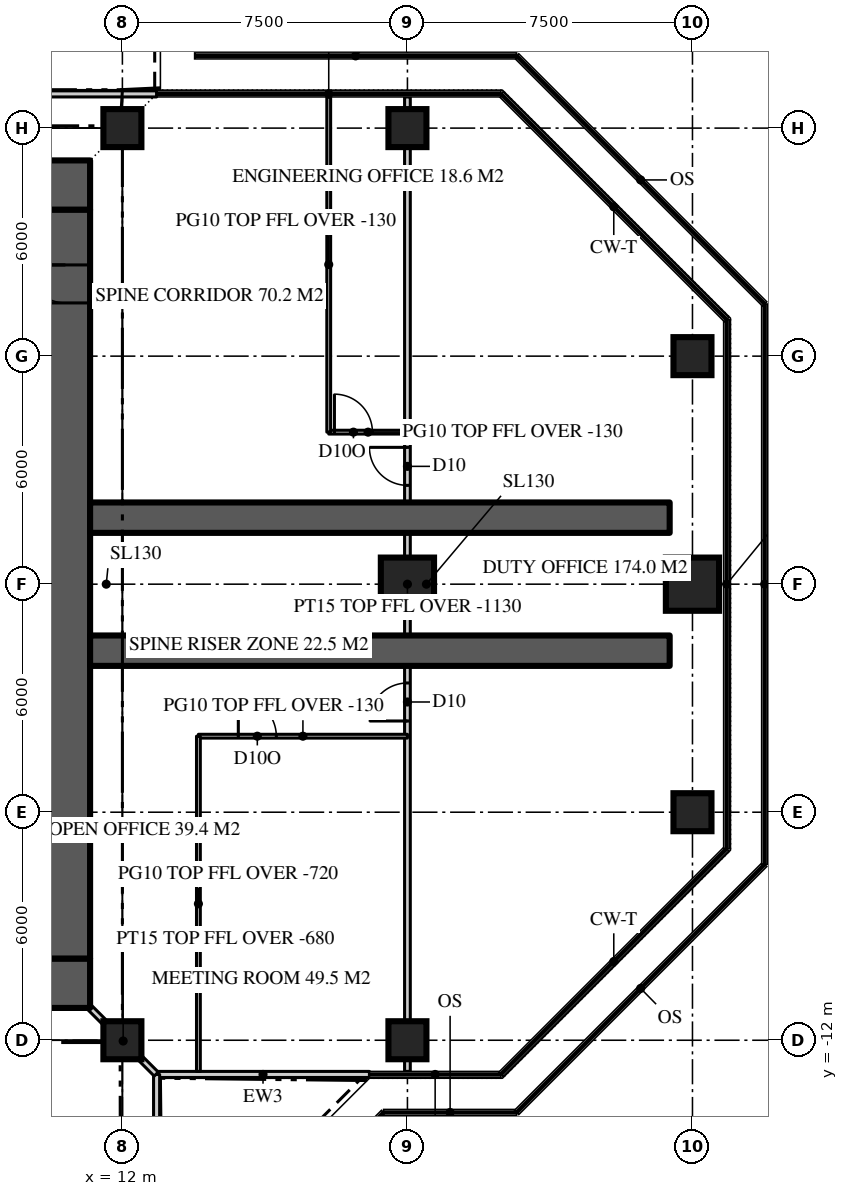
"""IFC4 building model, lengths in metres.
Left out: names, types, materials, properties, quantities, classifications, styles, units other than length and angle.
Written with IfcOpenShell. Run it as: python <this file> out.ifc"""

import sys

from ifc_helpers import new_model, si_unit, direction, frame, frame_2d, origin, origin_2d, place, context, subcontext, project, spatial, rectangle, extrude, element, fill, save


model = new_model("IFC4")
c1 = context("Model", 3, precision=1e-05, world=origin(), true_north=direction((0.0, 1.0)))
c2 = subcontext(c1, "Body", "Model", "MODEL_VIEW")
j1 = project(units=[si_unit("LENGTHUNIT", "METRE"), si_unit("PLANEANGLEUNIT", "RADIAN")], contexts=[c1])
p1 = place(None, origin())
s1 = spatial("IfcSite", under=j1, at=p1, CompositionType="ELEMENT")
p2 = place(p1, origin())
s2 = spatial("IfcBuilding", under=s1, at=p2, CompositionType="ELEMENT")
p3 = place(p2, frame((0.0, 0.0, 267.3)))
s3 = spatial("IfcBuildingStorey", under=s2, at=p3, CompositionType="ELEMENT", Elevation=267.3)
p4 = place(p3, frame((-11.15, 10.5, 0.0), z_axis=(0.0, 0.0, 1.0), x_axis=(1.0, 0.0, 0.0)))
e1 = element("IfcWall", 1, at=p4, inside=s3, PredefinedType="SHEAR", context=c2, shape_type="SweptSolid", body=[
    extrude(rectangle(XDim=22.3, YDim=1.3, at=frame_2d((11.15, 0.0))), origin(), (0.0, 0.0, 1.0), 3.9),
])
p5 = place(p4, frame((4.25, 0.0, 0.0)))
e2 = element("IfcOpeningElement", 2, at=p5, cuts=e1, PredefinedType="OPENING", context=c2, shape_type="SweptSolid", body=[
    extrude(rectangle(XDim=1.8, YDim=2.2, at=frame_2d((0.9, 1.1))), frame((0.0, 0.66, 0.0), z_axis=(0.0, -1.0, 0.0), x_axis=(1.0, 0.0, 0.0)), (0.0, 0.0, 1.0), 1.32),
])
p6 = place(p4, frame((16.25, 0.0, 0.0)))
e3 = element("IfcOpeningElement", 3, at=p6, cuts=e1, PredefinedType="OPENING", context=c2, shape_type="SweptSolid", body=[
    extrude(rectangle(XDim=1.8, YDim=2.2, at=frame_2d((0.9, 1.1))), frame((0.0, 0.66, 0.0), z_axis=(0.0, -1.0, 0.0), x_axis=(1.0, 0.0, 0.0)), (0.0, 0.0, 1.0), 1.32),
])
p7 = place(p3, frame((11.15, -10.5, 0.0), z_axis=(0.0, 0.0, 1.0), x_axis=(-1.0, 0.0, 0.0)))
e4 = element("IfcWall", 4, at=p7, inside=s3, PredefinedType="SHEAR", context=c2, shape_type="SweptSolid", body=[
    extrude(rectangle(XDim=22.3, YDim=1.3, at=frame_2d((11.15, 0.0))), origin(), (0.0, 0.0, 1.0), 3.9),
])
p8 = place(p7, frame((16.25, 0.0, 0.0)))
e5 = element("IfcOpeningElement", 5, at=p8, cuts=e4, PredefinedType="OPENING", context=c2, shape_type="SweptSolid", body=[
    extrude(rectangle(XDim=1.8, YDim=2.2, at=frame_2d((0.9, 1.1))), frame((0.0, 0.66, 0.0), z_axis=(0.0, -1.0, 0.0), x_axis=(1.0, 0.0, 0.0)), (0.0, 0.0, 1.0), 1.32),
])
p9 = place(p7, frame((4.25, 0.0, 0.0)))
e6 = element("IfcOpeningElement", 6, at=p9, cuts=e4, PredefinedType="OPENING", context=c2, shape_type="SweptSolid", body=[
    extrude(rectangle(XDim=1.8, YDim=2.2, at=frame_2d((0.9, 1.1))), frame((0.0, 0.66, 0.0), z_axis=(0.0, -1.0, 0.0), x_axis=(1.0, 0.0, 0.0)), (0.0, 0.0, 1.0), 1.32),
])
p10 = place(p3, frame((10.5, -9.85, 0.0), z_axis=(0.0, 0.0, 1.0), x_axis=(0.0, 1.0, 0.0)))
e7 = element("IfcWall", 7, at=p10, inside=s3, PredefinedType="SHEAR", context=c2, shape_type="SweptSolid", body=[
    extrude(rectangle(XDim=19.7, YDim=1.3, at=frame_2d((9.85, 0.0))), origin(), (0.0, 0.0, 1.0), 3.9),
])
p11 = place(p10, frame((17.25, 0.0, 0.0)))
e8 = element("IfcOpeningElement", 8, at=p11, cuts=e7, PredefinedType="OPENING", context=c2, shape_type="SweptSolid", body=[
    extrude(rectangle(XDim=1.0, YDim=2.2, at=frame_2d((0.5, 1.1))), frame((0.0, 0.66, 0.0), z_axis=(0.0, -1.0, 0.0), x_axis=(1.0, 0.0, 0.0)), (0.0, 0.0, 1.0), 1.32),
])
for number, where, z_axis, x_axis in (
    (9, (11.15, -1.75, 0.0), (0.0, 0.0, 1.0), (1.0, 0.0, 0.0)),
    (10, (11.15, 1.75, 0.0), (0.0, 0.0, 1.0), (1.0, 0.0, 0.0)),
):
    element("IfcWall", number, at=place(p3, frame(where, z_axis=z_axis, x_axis=x_axis)), inside=s3, PredefinedType="SHEAR", context=c2, shape_type="SweptSolid", body=[
        extrude(rectangle(XDim=15.25, YDim=0.8, at=frame_2d((7.625, 0.0))), origin(), (0.0, 0.0, 1.0), 3.9),
    ])
for number, where, z_axis, x_axis in (
    (11, (12.0, -12.0, 0.0), (0.0, 0.0, 1.0), (1.0, 0.0, 0.0)),
    (12, (19.5, -12.0, 0.0), (0.0, 0.0, 1.0), (1.0, 0.0, 0.0)),
    (13, (27.0, -6.0, 0.0), (0.0, 0.0, 1.0), (1.0, 0.0, 0.0)),
):
    element("IfcColumn", number, at=place(p3, frame(where, z_axis=z_axis, x_axis=x_axis)), inside=s3, PredefinedType="COLUMN", context=c2, shape_type="SweptSolid", body=[
        extrude(rectangle(XDim=1.0, YDim=1.0, at=origin_2d()), origin(), (0.0, 0.0, 1.0), 3.9),
    ])
for number, where, z_axis, x_axis in (
    (14, (19.5, 0.0, 0.0), (0.0, 0.0, 1.0), (1.0, 0.0, 0.0)),
    (15, (27.0, 0.0, 0.0), (0.0, 0.0, 1.0), (1.0, 0.0, 0.0)),
):
    element("IfcColumn", number, at=place(p3, frame(where, z_axis=z_axis, x_axis=x_axis)), inside=s3, PredefinedType="COLUMN", context=c2, shape_type="SweptSolid", body=[
        extrude(rectangle(XDim=1.4, YDim=1.4, at=origin_2d()), origin(), (0.0, 0.0, 1.0), 3.9),
    ])
for number, where, z_axis, x_axis in (
    (16, (27.0, 6.0, 0.0), (0.0, 0.0, 1.0), (1.0, 0.0, 0.0)),
    (17, (12.0, 12.0, 0.0), (0.0, 0.0, 1.0), (1.0, 0.0, 0.0)),
    (18, (19.5, 12.0, 0.0), (0.0, 0.0, 1.0), (1.0, 0.0, 0.0)),
):
    element("IfcColumn", number, at=place(p3, frame(where, z_axis=z_axis, x_axis=x_axis)), inside=s3, PredefinedType="COLUMN", context=c2, shape_type="SweptSolid", body=[
        extrude(rectangle(XDim=1.0, YDim=1.0, at=origin_2d()), origin(), (0.0, 0.0, 1.0), 3.9),
    ])
p12 = place(p3, frame((12.9, -12.9, 0.0), z_axis=(0.0, 0.0, 1.0), x_axis=(1.0, 0.0, 0.0)))
e19 = element("IfcWall", 19, at=p12, inside=s3, PredefinedType="SOLIDWALL", context=c2, shape_type="SweptSolid", body=[
    extrude(rectangle(XDim=5.6, YDim=0.16, at=frame_2d((2.8, 0.0))), origin(), (0.0, 0.0, 1.0), 3.77),
])
p13 = place(p3, frame((12.9, 12.9, 0.0), z_axis=(0.0, 0.0, 1.0), x_axis=(-1.0, 0.0, 0.0)))
e20 = element("IfcWall", 20, at=p13, inside=s3, PredefinedType="SOLIDWALL", context=c2, shape_type="SweptSolid", body=[
    extrude(rectangle(XDim=25.8, YDim=0.16, at=frame_2d((12.9, 0.0))), origin(), (0.0, 0.0, 1.0), 3.77),
])
p14 = place(p13, frame((4.4, 0.0, 0.0)))
e21 = element("IfcOpeningElement", 21, at=p14, cuts=e20, PredefinedType="OPENING", context=c2, shape_type="SweptSolid", body=[
    extrude(rectangle(XDim=1.0, YDim=2.2, at=frame_2d((0.5, 1.1))), frame((0.0, 0.09, 0.0), z_axis=(0.0, -1.0, 0.0), x_axis=(1.0, 0.0, 0.0)), (0.0, 0.0, 1.0), 0.18),
])
p15 = place(p13, frame((20.4, 0.0, 0.0)))
e22 = element("IfcOpeningElement", 22, at=p15, cuts=e20, PredefinedType="OPENING", context=c2, shape_type="SweptSolid", body=[
    extrude(rectangle(XDim=1.0, YDim=2.2, at=frame_2d((0.5, 1.1))), frame((0.0, 0.09, 0.0), z_axis=(0.0, -1.0, 0.0), x_axis=(1.0, 0.0, 0.0)), (0.0, 0.0, 1.0), 0.18),
])
p16 = place(p3, frame((12.9, -18.5, 0.0), z_axis=(0.0, 0.0, 1.0), x_axis=(0.0, 1.0, 0.0)))
e23 = element("IfcWall", 23, at=p16, inside=s3, PredefinedType="SOLIDWALL", context=c2, shape_type="SweptSolid", body=[
    extrude(rectangle(XDim=5.6, YDim=0.16, at=frame_2d((2.8, 0.0))), origin(), (0.0, 0.0, 1.0), 3.77),
])
p17 = place(p16, frame((2.3, 0.0, 0.0)))
e24 = element("IfcOpeningElement", 24, at=p17, cuts=e23, PredefinedType="OPENING", context=c2, shape_type="SweptSolid", body=[
    extrude(rectangle(XDim=1.0, YDim=2.2, at=frame_2d((0.5, 1.1))), frame((0.0, 0.09, 0.0), z_axis=(0.0, -1.0, 0.0), x_axis=(1.0, 0.0, 0.0)), (0.0, 0.0, 1.0), 0.18),
])
p18 = place(p3, frame((19.5, -12.82, 0.0), z_axis=(0.0, 0.0, 1.0), x_axis=(0.0, 1.0, 0.0)))
e25 = element("IfcWall", 25, at=p18, inside=s3, PredefinedType="PARTITIONING", context=c2, shape_type="SweptSolid", body=[
    extrude(rectangle(XDim=25.64, YDim=0.15, at=frame_2d((12.82, 0.0))), origin(), (0.0, 0.0, 1.0), 2.77),
])
p19 = place(p18, frame((15.42, 0.0, 0.0)))
e26 = element("IfcOpeningElement", 26, at=p19, cuts=e25, PredefinedType="OPENING", context=c2, shape_type="SweptSolid", body=[
    extrude(rectangle(XDim=1.0, YDim=2.2, at=frame_2d((0.5, 1.1))), frame((0.0, 0.085, 0.0), z_axis=(0.0, -1.0, 0.0), x_axis=(1.0, 0.0, 0.0)), (0.0, 0.0, 1.0), 0.17),
])
p20 = place(p18, frame((9.22, 0.0, 0.0)))
e27 = element("IfcOpeningElement", 27, at=p20, cuts=e25, PredefinedType="OPENING", context=c2, shape_type="SweptSolid", body=[
    extrude(rectangle(XDim=1.0, YDim=2.2, at=frame_2d((0.5, 1.1))), frame((0.0, 0.085, 0.0), z_axis=(0.0, -1.0, 0.0), x_axis=(1.0, 0.0, 0.0)), (0.0, 0.0, 1.0), 0.17),
])
p21 = place(p3, frame((17.429, 4.0, 0.0), z_axis=(0.0, 0.0, 1.0), x_axis=(1.0, 0.0, 0.0)))
e28 = element("IfcWall", 28, at=p21, inside=s3, PredefinedType="PARTITIONING", context=c2, shape_type="SweptSolid", body=[
    extrude(rectangle(XDim=2.071, YDim=0.1, at=frame_2d((1.036, 0.0))), origin(), (0.0, 0.0, 1.0), 3.77),
])
p22 = place(p21, frame((0.15, 0.0, 0.0)))
e29 = element("IfcOpeningElement", 29, at=p22, cuts=e28, PredefinedType="OPENING", context=c2, shape_type="SweptSolid", body=[
    extrude(rectangle(XDim=1.0, YDim=2.2, at=frame_2d((0.5, 1.1))), frame((0.0, 0.06, 0.0), z_axis=(0.0, -1.0, 0.0), x_axis=(1.0, 0.0, 0.0)), (0.0, 0.0, 1.0), 0.12),
])
p23 = place(p3, frame((17.429, 4.0, 0.0), z_axis=(0.0, 0.0, 1.0), x_axis=(0.0, 1.0, 0.0)))
e30 = element("IfcWall", 30, at=p23, inside=s3, PredefinedType="PARTITIONING", context=c2, shape_type="SweptSolid", body=[
    extrude(rectangle(XDim=8.82, YDim=0.1, at=frame_2d((4.41, 0.0))), origin(), (0.0, 0.0, 1.0), 3.77),
])
p24 = place(p3, frame((14.0, -4.0, 0.0), z_axis=(0.0, 0.0, 1.0), x_axis=(1.0, 0.0, 0.0)))
e31 = element("IfcWall", 31, at=p24, inside=s3, PredefinedType="PARTITIONING", context=c2, shape_type="SweptSolid", body=[
    extrude(rectangle(XDim=5.5, YDim=0.1, at=frame_2d((2.75, 0.0))), origin(), (0.0, 0.0, 1.0), 3.77),
])
p25 = place(p24, frame((1.05, 0.0, 0.0)))
e32 = element("IfcOpeningElement", 32, at=p25, cuts=e31, PredefinedType="OPENING", context=c2, shape_type="SweptSolid", body=[
    extrude(rectangle(XDim=1.0, YDim=2.2, at=frame_2d((0.5, 1.1))), frame((0.0, 0.06, 0.0), z_axis=(0.0, -1.0, 0.0), x_axis=(1.0, 0.0, 0.0)), (0.0, 0.0, 1.0), 0.12),
])
p26 = place(p3, frame((14.0, -4.0, 0.0), z_axis=(0.0, 0.0, 1.0), x_axis=(0.0, -1.0, 0.0)))
e33 = element("IfcWall", 33, at=p26, inside=s3, PredefinedType="PARTITIONING", context=c2, shape_type="SweptSolid", body=[
    extrude(rectangle(XDim=8.82, YDim=0.1, at=frame_2d((4.41, 0.0))), origin(), (0.0, 0.0, 1.0), 3.18),
])
p27 = place(p3, frame((11.15, -11.15, 0.0), z_axis=(0.0, 0.0, 1.0), x_axis=(0.707106781187, -0.707106781187, 0.0)))
e34 = element("IfcWall", 34, at=p27, inside=s3, PredefinedType="PARTITIONING", context=c2, shape_type="SweptSolid", body=[
    extrude(rectangle(XDim=2.461, YDim=0.15, at=frame_2d((1.23, 0.0))), origin(), (0.0, 0.0, 1.0), 3.22),
])
p28 = place(p11, origin())
e35 = element("IfcDoor", 35, at=p28, inside=s3, OperationType="SINGLE_SWING_RIGHT", PredefinedType="DOOR", context=c2, shape_type="SweptSolid", body=[
    extrude(rectangle(XDim=1.0, YDim=2.2, at=frame_2d((0.5, 1.1))), frame((0.0, 0.025, 0.0), z_axis=(0.0, -1.0, 0.0), x_axis=(1.0, 0.0, 0.0)), (0.0, 0.0, 1.0), 0.05),
])
fill(e8, e35)
p29 = place(p19, origin())
e36 = element("IfcDoor", 36, at=p29, inside=s3, OperationType="SINGLE_SWING_RIGHT", PredefinedType="DOOR", context=c2, shape_type="SweptSolid", body=[
    extrude(rectangle(XDim=1.0, YDim=2.2, at=frame_2d((0.5, 1.1))), frame((0.0, 0.025, 0.0), z_axis=(0.0, -1.0, 0.0), x_axis=(1.0, 0.0, 0.0)), (0.0, 0.0, 1.0), 0.05),
])
fill(e26, e36)
p30 = place(p20, origin())
e37 = element("IfcDoor", 37, at=p30, inside=s3, OperationType="SINGLE_SWING_LEFT", PredefinedType="DOOR", context=c2, shape_type="SweptSolid", body=[
    extrude(rectangle(XDim=1.0, YDim=2.2, at=frame_2d((0.5, 1.1))), frame((0.0, 0.025, 0.0), z_axis=(0.0, -1.0, 0.0), x_axis=(1.0, 0.0, 0.0)), (0.0, 0.0, 1.0), 0.05),
])
fill(e27, e37)
p31 = place(p22, origin())
e38 = element("IfcDoor", 38, at=p31, inside=s3, OperationType="SINGLE_SWING_LEFT", PredefinedType="DOOR", context=c2, shape_type="SweptSolid", body=[
    extrude(rectangle(XDim=1.0, YDim=2.2, at=frame_2d((0.5, 1.1))), frame((0.0, 0.025, 0.0), z_axis=(0.0, -1.0, 0.0), x_axis=(1.0, 0.0, 0.0)), (0.0, 0.0, 1.0), 0.05),
])
fill(e29, e38)
p32 = place(p25, origin())
e39 = element("IfcDoor", 39, at=p32, inside=s3, OperationType="SINGLE_SWING_LEFT", PredefinedType="DOOR", context=c2, shape_type="SweptSolid", body=[
    extrude(rectangle(XDim=1.0, YDim=2.2, at=frame_2d((0.5, 1.1))), frame((0.0, 0.025, 0.0), z_axis=(0.0, -1.0, 0.0), x_axis=(1.0, 0.0, 0.0)), (0.0, 0.0, 1.0), 0.05),
])
fill(e32, e39)
save(model, sys.argv[1])
